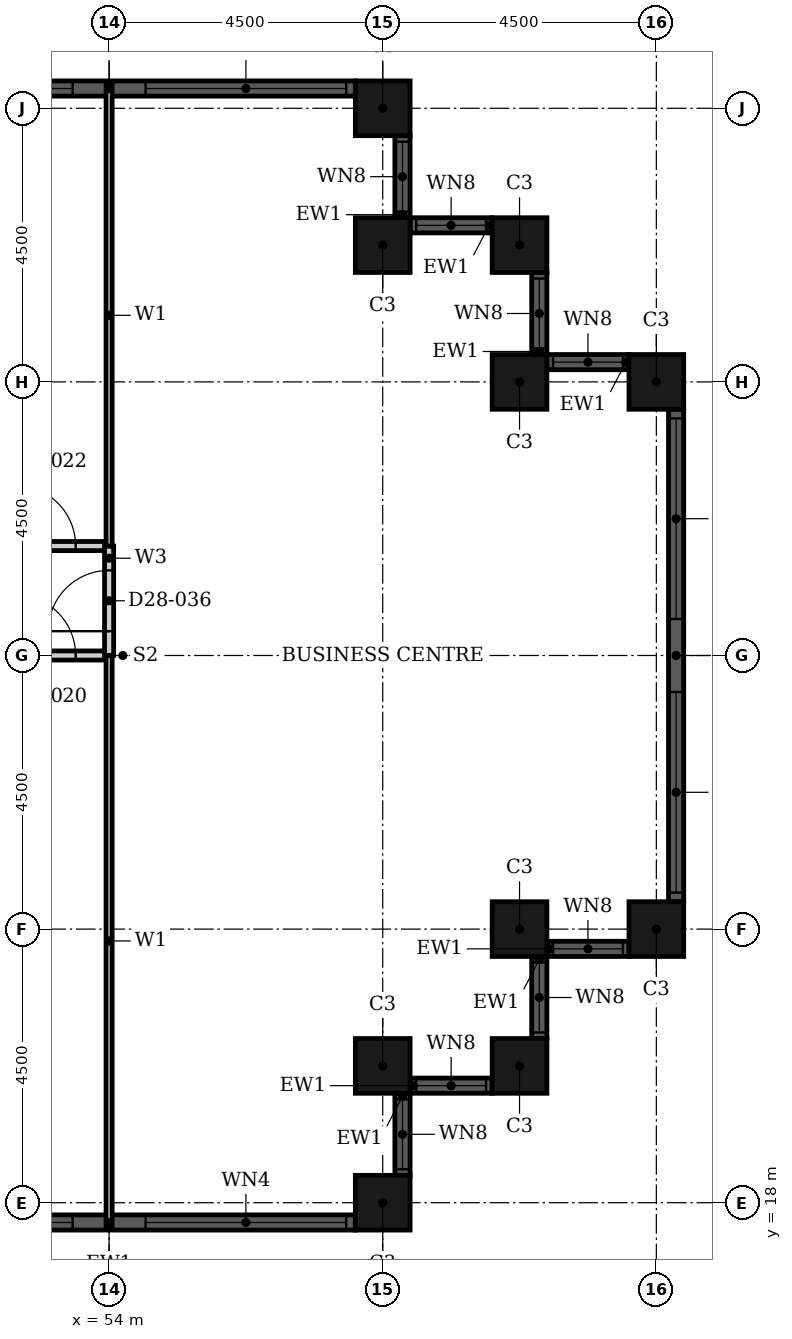
"""IFC4 building model, lengths in metres.
Left out: names, types, materials, properties, quantities, classifications, styles, units other than length and angle.
Written with IfcOpenShell. Run it as: python <this file> out.ifc"""

import sys

from ifc_helpers import new_model, si_unit, direction, frame, frame_2d, origin, origin_2d, place, context, subcontext, project, spatial, rectangle, hollow_rectangle, extrude, element, fill, save


model = new_model("IFC4")
c1 = context("Model", 3, precision=1e-05, world=origin(), true_north=direction((0.0, 1.0)))
c2 = subcontext(c1, "Body", "Model", "MODEL_VIEW")
j1 = project(units=[si_unit("LENGTHUNIT", "METRE"), si_unit("PLANEANGLEUNIT", "RADIAN")], contexts=[c1])
p1 = place(None, origin())
s1 = spatial("IfcSite", under=j1, at=p1, CompositionType="ELEMENT")
p2 = place(p1, origin())
s2 = spatial("IfcBuilding", under=s1, at=p2, CompositionType="ELEMENT")
p3 = place(p2, frame((0.0, 0.0, 115.2)))
s3 = spatial("IfcBuildingStorey", under=s2, at=p3, CompositionType="ELEMENT", Elevation=115.2)
for number, where, z_axis, x_axis in (
    (1, (58.5, 18.0, 0.0), (0.0, 0.0, 1.0), (1.0, 0.0, 0.0)),
    (2, (58.5, 20.25, 0.0), (0.0, 0.0, 1.0), (1.0, 0.0, 0.0)),
    (3, (60.75, 20.25, 0.0), (0.0, 0.0, 1.0), (1.0, 0.0, 0.0)),
    (4, (60.75, 22.5, 0.0), (0.0, 0.0, 1.0), (1.0, 0.0, 0.0)),
    (5, (63.0, 22.5, 0.0), (0.0, 0.0, 1.0), (1.0, 0.0, 0.0)),
    (6, (63.0, 31.5, 0.0), (0.0, 0.0, 1.0), (1.0, 0.0, 0.0)),
    (7, (60.75, 31.5, 0.0), (0.0, 0.0, 1.0), (1.0, 0.0, 0.0)),
    (8, (60.75, 33.75, 0.0), (0.0, 0.0, 1.0), (1.0, 0.0, 0.0)),
    (9, (58.5, 33.75, 0.0), (0.0, 0.0, 1.0), (1.0, 0.0, 0.0)),
    (10, (58.5, 36.0, 0.0), (0.0, 0.0, 1.0), (1.0, 0.0, 0.0)),
):
    element("IfcColumn", number, at=place(p3, frame(where, z_axis=z_axis, x_axis=x_axis)), inside=s3, PredefinedType="COLUMN", context=c2, shape_type="SweptSolid", body=[
        extrude(hollow_rectangle(XDim=0.9, YDim=0.9, WallThickness=0.028, at=origin_2d()), origin(), (0.0, 0.0, 1.0), 3.6),
    ])
p4 = place(p3, frame((49.95, 17.675, 0.0), z_axis=(0.0, 0.0, 1.0), x_axis=(1.0, 0.0, 0.0)))
e11 = element("IfcWall", 11, at=p4, inside=s3, PredefinedType="SOLIDWALL", context=c2, shape_type="SweptSolid", body=[
    extrude(rectangle(XDim=8.1, YDim=0.25, at=frame_2d((4.05, 0.0))), origin(), (0.0, 0.0, 1.0), 3.6),
])
p5 = place(p4, frame((0.15, 0.0, 0.9)))
e12 = element("IfcOpeningElement", 12, at=p5, cuts=e11, PredefinedType="OPENING", context=c2, shape_type="SweptSolid", body=[
    extrude(rectangle(XDim=3.3, YDim=2.08, at=frame_2d((1.65, 1.04))), frame((0.0, 0.135, 0.0), z_axis=(0.0, -1.0, 0.0), x_axis=(1.0, 0.0, 0.0)), (0.0, 0.0, 1.0), 0.27),
])
p6 = place(p4, frame((4.65, 0.0, 0.9)))
e13 = element("IfcOpeningElement", 13, at=p6, cuts=e11, PredefinedType="OPENING", context=c2, shape_type="SweptSolid", body=[
    extrude(rectangle(XDim=3.3, YDim=2.08, at=frame_2d((1.65, 1.04))), frame((0.0, 0.135, 0.0), z_axis=(0.0, -1.0, 0.0), x_axis=(1.0, 0.0, 0.0)), (0.0, 0.0, 1.0), 0.27),
])
p7 = place(p3, frame((58.825, 18.45, 0.0), z_axis=(0.0, 0.0, 1.0), x_axis=(0.0, 1.0, 0.0)))
e14 = element("IfcWall", 14, at=p7, inside=s3, PredefinedType="SOLIDWALL", context=c2, shape_type="SweptSolid", body=[
    extrude(rectangle(XDim=1.35, YDim=0.25, at=frame_2d((0.675, 0.0))), origin(), (0.0, 0.0, 1.0), 3.6),
])
p8 = place(p7, frame((0.1, 0.0, 0.9)))
e15 = element("IfcOpeningElement", 15, at=p8, cuts=e14, PredefinedType="OPENING", context=c2, shape_type="SweptSolid", body=[
    extrude(rectangle(XDim=1.15, YDim=2.08, at=frame_2d((0.575, 1.04))), frame((0.0, 0.135, 0.0), z_axis=(0.0, -1.0, 0.0), x_axis=(1.0, 0.0, 0.0)), (0.0, 0.0, 1.0), 0.27),
])
p9 = place(p3, frame((58.95, 19.925, 0.0), z_axis=(0.0, 0.0, 1.0), x_axis=(1.0, 0.0, 0.0)))
e16 = element("IfcWall", 16, at=p9, inside=s3, PredefinedType="SOLIDWALL", context=c2, shape_type="SweptSolid", body=[
    extrude(rectangle(XDim=1.35, YDim=0.25, at=frame_2d((0.675, 0.0))), origin(), (0.0, 0.0, 1.0), 3.6),
])
p10 = place(p9, frame((0.1, 0.0, 0.9)))
e17 = element("IfcOpeningElement", 17, at=p10, cuts=e16, PredefinedType="OPENING", context=c2, shape_type="SweptSolid", body=[
    extrude(rectangle(XDim=1.15, YDim=2.08, at=frame_2d((0.575, 1.04))), frame((0.0, 0.135, 0.0), z_axis=(0.0, -1.0, 0.0), x_axis=(1.0, 0.0, 0.0)), (0.0, 0.0, 1.0), 0.27),
])
p11 = place(p3, frame((61.075, 20.7, 0.0), z_axis=(0.0, 0.0, 1.0), x_axis=(0.0, 1.0, 0.0)))
e18 = element("IfcWall", 18, at=p11, inside=s3, PredefinedType="SOLIDWALL", context=c2, shape_type="SweptSolid", body=[
    extrude(rectangle(XDim=1.35, YDim=0.25, at=frame_2d((0.675, 0.0))), origin(), (0.0, 0.0, 1.0), 3.6),
])
p12 = place(p11, frame((0.1, 0.0, 0.9)))
e19 = element("IfcOpeningElement", 19, at=p12, cuts=e18, PredefinedType="OPENING", context=c2, shape_type="SweptSolid", body=[
    extrude(rectangle(XDim=1.15, YDim=2.08, at=frame_2d((0.575, 1.04))), frame((0.0, 0.135, 0.0), z_axis=(0.0, -1.0, 0.0), x_axis=(1.0, 0.0, 0.0)), (0.0, 0.0, 1.0), 0.27),
])
p13 = place(p3, frame((61.2, 22.175, 0.0), z_axis=(0.0, 0.0, 1.0), x_axis=(1.0, 0.0, 0.0)))
e20 = element("IfcWall", 20, at=p13, inside=s3, PredefinedType="SOLIDWALL", context=c2, shape_type="SweptSolid", body=[
    extrude(rectangle(XDim=1.35, YDim=0.25, at=frame_2d((0.675, 0.0))), origin(), (0.0, 0.0, 1.0), 3.6),
])
p14 = place(p13, frame((0.1, 0.0, 0.9)))
e21 = element("IfcOpeningElement", 21, at=p14, cuts=e20, PredefinedType="OPENING", context=c2, shape_type="SweptSolid", body=[
    extrude(rectangle(XDim=1.15, YDim=2.08, at=frame_2d((0.575, 1.04))), frame((0.0, 0.135, 0.0), z_axis=(0.0, -1.0, 0.0), x_axis=(1.0, 0.0, 0.0)), (0.0, 0.0, 1.0), 0.27),
])
p15 = place(p3, frame((63.325, 22.95, 0.0), z_axis=(0.0, 0.0, 1.0), x_axis=(0.0, 1.0, 0.0)))
e22 = element("IfcWall", 22, at=p15, inside=s3, PredefinedType="SOLIDWALL", context=c2, shape_type="SweptSolid", body=[
    extrude(rectangle(XDim=8.1, YDim=0.25, at=frame_2d((4.05, 0.0))), origin(), (0.0, 0.0, 1.0), 3.6),
])
p16 = place(p15, frame((0.15, 0.0, 0.9)))
e23 = element("IfcOpeningElement", 23, at=p16, cuts=e22, PredefinedType="OPENING", context=c2, shape_type="SweptSolid", body=[
    extrude(rectangle(XDim=3.3, YDim=2.08, at=frame_2d((1.65, 1.04))), frame((0.0, 0.135, 0.0), z_axis=(0.0, -1.0, 0.0), x_axis=(1.0, 0.0, 0.0)), (0.0, 0.0, 1.0), 0.27),
])
p17 = place(p15, frame((4.65, 0.0, 0.9)))
e24 = element("IfcOpeningElement", 24, at=p17, cuts=e22, PredefinedType="OPENING", context=c2, shape_type="SweptSolid", body=[
    extrude(rectangle(XDim=3.3, YDim=2.08, at=frame_2d((1.65, 1.04))), frame((0.0, 0.135, 0.0), z_axis=(0.0, -1.0, 0.0), x_axis=(1.0, 0.0, 0.0)), (0.0, 0.0, 1.0), 0.27),
])
p18 = place(p3, frame((62.55, 31.825, 0.0), z_axis=(0.0, 0.0, 1.0), x_axis=(-1.0, 0.0, 0.0)))
e25 = element("IfcWall", 25, at=p18, inside=s3, PredefinedType="SOLIDWALL", context=c2, shape_type="SweptSolid", body=[
    extrude(rectangle(XDim=1.35, YDim=0.25, at=frame_2d((0.675, 0.0))), origin(), (0.0, 0.0, 1.0), 3.6),
])
p19 = place(p18, frame((0.1, 0.0, 0.9)))
e26 = element("IfcOpeningElement", 26, at=p19, cuts=e25, PredefinedType="OPENING", context=c2, shape_type="SweptSolid", body=[
    extrude(rectangle(XDim=1.15, YDim=2.08, at=frame_2d((0.575, 1.04))), frame((0.0, 0.135, 0.0), z_axis=(0.0, -1.0, 0.0), x_axis=(1.0, 0.0, 0.0)), (0.0, 0.0, 1.0), 0.27),
])
p20 = place(p3, frame((61.075, 31.95, 0.0), z_axis=(0.0, 0.0, 1.0), x_axis=(0.0, 1.0, 0.0)))
e27 = element("IfcWall", 27, at=p20, inside=s3, PredefinedType="SOLIDWALL", context=c2, shape_type="SweptSolid", body=[
    extrude(rectangle(XDim=1.35, YDim=0.25, at=frame_2d((0.675, 0.0))), origin(), (0.0, 0.0, 1.0), 3.6),
])
p21 = place(p20, frame((0.1, 0.0, 0.9)))
e28 = element("IfcOpeningElement", 28, at=p21, cuts=e27, PredefinedType="OPENING", context=c2, shape_type="SweptSolid", body=[
    extrude(rectangle(XDim=1.15, YDim=2.08, at=frame_2d((0.575, 1.04))), frame((0.0, 0.135, 0.0), z_axis=(0.0, -1.0, 0.0), x_axis=(1.0, 0.0, 0.0)), (0.0, 0.0, 1.0), 0.27),
])
p22 = place(p3, frame((60.3, 34.075, 0.0), z_axis=(0.0, 0.0, 1.0), x_axis=(-1.0, 0.0, 0.0)))
e29 = element("IfcWall", 29, at=p22, inside=s3, PredefinedType="SOLIDWALL", context=c2, shape_type="SweptSolid", body=[
    extrude(rectangle(XDim=1.35, YDim=0.25, at=frame_2d((0.675, 0.0))), origin(), (0.0, 0.0, 1.0), 3.6),
])
p23 = place(p22, frame((0.1, 0.0, 0.9)))
e30 = element("IfcOpeningElement", 30, at=p23, cuts=e29, PredefinedType="OPENING", context=c2, shape_type="SweptSolid", body=[
    extrude(rectangle(XDim=1.15, YDim=2.08, at=frame_2d((0.575, 1.04))), frame((0.0, 0.135, 0.0), z_axis=(0.0, -1.0, 0.0), x_axis=(1.0, 0.0, 0.0)), (0.0, 0.0, 1.0), 0.27),
])
p24 = place(p3, frame((58.825, 34.2, 0.0), z_axis=(0.0, 0.0, 1.0), x_axis=(0.0, 1.0, 0.0)))
e31 = element("IfcWall", 31, at=p24, inside=s3, PredefinedType="SOLIDWALL", context=c2, shape_type="SweptSolid", body=[
    extrude(rectangle(XDim=1.35, YDim=0.25, at=frame_2d((0.675, 0.0))), origin(), (0.0, 0.0, 1.0), 3.6),
])
p25 = place(p24, frame((0.1, 0.0, 0.9)))
e32 = element("IfcOpeningElement", 32, at=p25, cuts=e31, PredefinedType="OPENING", context=c2, shape_type="SweptSolid", body=[
    extrude(rectangle(XDim=1.15, YDim=2.08, at=frame_2d((0.575, 1.04))), frame((0.0, 0.135, 0.0), z_axis=(0.0, -1.0, 0.0), x_axis=(1.0, 0.0, 0.0)), (0.0, 0.0, 1.0), 0.27),
])
p26 = place(p3, frame((58.05, 36.325, 0.0), z_axis=(0.0, 0.0, 1.0), x_axis=(-1.0, 0.0, 0.0)))
e33 = element("IfcWall", 33, at=p26, inside=s3, PredefinedType="SOLIDWALL", context=c2, shape_type="SweptSolid", body=[
    extrude(rectangle(XDim=8.1, YDim=0.25, at=frame_2d((4.05, 0.0))), origin(), (0.0, 0.0, 1.0), 3.6),
])
p27 = place(p26, frame((0.15, 0.0, 0.9)))
e34 = element("IfcOpeningElement", 34, at=p27, cuts=e33, PredefinedType="OPENING", context=c2, shape_type="SweptSolid", body=[
    extrude(rectangle(XDim=3.3, YDim=2.08, at=frame_2d((1.65, 1.04))), frame((0.0, 0.135, 0.0), z_axis=(0.0, -1.0, 0.0), x_axis=(1.0, 0.0, 0.0)), (0.0, 0.0, 1.0), 0.27),
])
p28 = place(p26, frame((4.65, 0.0, 0.9)))
e35 = element("IfcOpeningElement", 35, at=p28, cuts=e33, PredefinedType="OPENING", context=c2, shape_type="SweptSolid", body=[
    extrude(rectangle(XDim=3.3, YDim=2.08, at=frame_2d((1.65, 1.04))), frame((0.0, 0.135, 0.0), z_axis=(0.0, -1.0, 0.0), x_axis=(1.0, 0.0, 0.0)), (0.0, 0.0, 1.0), 0.27),
])
p29 = place(p3, frame((46.8, 27.0, 0.0), z_axis=(0.0, 0.0, 1.0), x_axis=(1.0, 0.0, 0.0)))
e36 = element("IfcWall", 36, at=p29, inside=s3, PredefinedType="PARTITIONING", context=c2, shape_type="SweptSolid", body=[
    extrude(rectangle(XDim=7.2, YDim=0.15, at=frame_2d((3.6, 0.0))), origin(), (0.0, 0.0, 1.0), 2.58),
])
p30 = place(p29, frame((5.65, 0.0, 0.0)))
e37 = element("IfcOpeningElement", 37, at=p30, cuts=e36, PredefinedType="OPENING", context=c2, shape_type="SweptSolid", body=[
    extrude(rectangle(XDim=1.0, YDim=2.1, at=frame_2d((0.5, 1.05))), frame((0.0, 0.085, 0.0), z_axis=(0.0, -1.0, 0.0), x_axis=(1.0, 0.0, 0.0)), (0.0, 0.0, 1.0), 0.17),
])
p31 = place(p3, frame((46.8, 28.8, 0.0), z_axis=(0.0, 0.0, 1.0), x_axis=(1.0, 0.0, 0.0)))
e38 = element("IfcWall", 38, at=p31, inside=s3, PredefinedType="PARTITIONING", context=c2, shape_type="SweptSolid", body=[
    extrude(rectangle(XDim=7.2, YDim=0.15, at=frame_2d((3.6, 0.0))), origin(), (0.0, 0.0, 1.0), 3.3),
])
p32 = place(p31, frame((5.65, 0.0, 0.0)))
e39 = element("IfcOpeningElement", 39, at=p32, cuts=e38, PredefinedType="OPENING", context=c2, shape_type="SweptSolid", body=[
    extrude(rectangle(XDim=1.0, YDim=2.1, at=frame_2d((0.5, 1.05))), frame((0.0, 0.085, 0.0), z_axis=(0.0, -1.0, 0.0), x_axis=(1.0, 0.0, 0.0)), (0.0, 0.0, 1.0), 0.17),
])
p33 = place(p3, frame((54.0, 27.0, 0.0), z_axis=(0.0, 0.0, 1.0), x_axis=(0.0, 1.0, 0.0)))
e40 = element("IfcWall", 40, at=p33, inside=s3, PredefinedType="PARTITIONING", context=c2, shape_type="SweptSolid", body=[
    extrude(rectangle(XDim=1.8, YDim=0.15, at=frame_2d((0.9, 0.0))), origin(), (0.0, 0.0, 1.0), 3.3),
])
p34 = place(p33, frame((0.4, 0.0, 0.0)))
e41 = element("IfcOpeningElement", 41, at=p34, cuts=e40, PredefinedType="OPENING", context=c2, shape_type="SweptSolid", body=[
    extrude(rectangle(XDim=1.0, YDim=2.1, at=frame_2d((0.5, 1.05))), frame((0.0, 0.085, 0.0), z_axis=(0.0, -1.0, 0.0), x_axis=(1.0, 0.0, 0.0)), (0.0, 0.0, 1.0), 0.17),
])
p35 = place(p3, frame((54.0, 28.8, 0.0), z_axis=(0.0, 0.0, 1.0), x_axis=(0.0, 1.0, 0.0)))
e42 = element("IfcWall", 42, at=p35, inside=s3, PredefinedType="PARTITIONING", context=c2, shape_type="SweptSolid", body=[
    extrude(rectangle(XDim=7.59, YDim=0.1, at=frame_2d((3.795, 0.0))), origin(), (0.0, 0.0, 1.0), 3.3),
])
p36 = place(p3, frame((54.0, 17.61, 0.0), z_axis=(0.0, 0.0, 1.0), x_axis=(0.0, 1.0, 0.0)))
e43 = element("IfcWall", 43, at=p36, inside=s3, PredefinedType="PARTITIONING", context=c2, shape_type="SweptSolid", body=[
    extrude(rectangle(XDim=9.39, YDim=0.1, at=frame_2d((4.695, 0.0))), origin(), (0.0, 0.0, 1.0), 3.3),
])
p37 = place(p5, origin())
e44 = element("IfcWindow", 44, at=p37, inside=s3, PartitioningType="SINGLE_PANEL", PredefinedType="WINDOW", context=c2, shape_type="SweptSolid", body=[
    extrude(rectangle(XDim=3.3, YDim=2.08, at=frame_2d((1.65, 1.04))), frame((0.0, 0.03, 0.0), z_axis=(0.0, -1.0, 0.0), x_axis=(1.0, 0.0, 0.0)), (0.0, 0.0, 1.0), 0.06),
])
fill(e12, e44)
p38 = place(p6, origin())
e45 = element("IfcWindow", 45, at=p38, inside=s3, PartitioningType="SINGLE_PANEL", PredefinedType="WINDOW", context=c2, shape_type="SweptSolid", body=[
    extrude(rectangle(XDim=3.3, YDim=2.08, at=frame_2d((1.65, 1.04))), frame((0.0, 0.03, 0.0), z_axis=(0.0, -1.0, 0.0), x_axis=(1.0, 0.0, 0.0)), (0.0, 0.0, 1.0), 0.06),
])
fill(e13, e45)
p39 = place(p8, origin())
e46 = element("IfcWindow", 46, at=p39, inside=s3, PartitioningType="SINGLE_PANEL", PredefinedType="WINDOW", context=c2, shape_type="SweptSolid", body=[
    extrude(rectangle(XDim=1.15, YDim=2.08, at=frame_2d((0.575, 1.04))), frame((0.0, 0.03, 0.0), z_axis=(0.0, -1.0, 0.0), x_axis=(1.0, 0.0, 0.0)), (0.0, 0.0, 1.0), 0.06),
])
fill(e15, e46)
p40 = place(p10, origin())
e47 = element("IfcWindow", 47, at=p40, inside=s3, PartitioningType="SINGLE_PANEL", PredefinedType="WINDOW", context=c2, shape_type="SweptSolid", body=[
    extrude(rectangle(XDim=1.15, YDim=2.08, at=frame_2d((0.575, 1.04))), frame((0.0, 0.03, 0.0), z_axis=(0.0, -1.0, 0.0), x_axis=(1.0, 0.0, 0.0)), (0.0, 0.0, 1.0), 0.06),
])
fill(e17, e47)
p41 = place(p12, origin())
e48 = element("IfcWindow", 48, at=p41, inside=s3, PartitioningType="SINGLE_PANEL", PredefinedType="WINDOW", context=c2, shape_type="SweptSolid", body=[
    extrude(rectangle(XDim=1.15, YDim=2.08, at=frame_2d((0.575, 1.04))), frame((0.0, 0.03, 0.0), z_axis=(0.0, -1.0, 0.0), x_axis=(1.0, 0.0, 0.0)), (0.0, 0.0, 1.0), 0.06),
])
fill(e19, e48)
p42 = place(p14, origin())
e49 = element("IfcWindow", 49, at=p42, inside=s3, PartitioningType="SINGLE_PANEL", PredefinedType="WINDOW", context=c2, shape_type="SweptSolid", body=[
    extrude(rectangle(XDim=1.15, YDim=2.08, at=frame_2d((0.575, 1.04))), frame((0.0, 0.03, 0.0), z_axis=(0.0, -1.0, 0.0), x_axis=(1.0, 0.0, 0.0)), (0.0, 0.0, 1.0), 0.06),
])
fill(e21, e49)
p43 = place(p16, origin())
e50 = element("IfcWindow", 50, at=p43, inside=s3, PartitioningType="SINGLE_PANEL", PredefinedType="WINDOW", context=c2, shape_type="SweptSolid", body=[
    extrude(rectangle(XDim=3.3, YDim=2.08, at=frame_2d((1.65, 1.04))), frame((0.0, 0.03, 0.0), z_axis=(0.0, -1.0, 0.0), x_axis=(1.0, 0.0, 0.0)), (0.0, 0.0, 1.0), 0.06),
])
fill(e23, e50)
p44 = place(p17, origin())
e51 = element("IfcWindow", 51, at=p44, inside=s3, PartitioningType="SINGLE_PANEL", PredefinedType="WINDOW", context=c2, shape_type="SweptSolid", body=[
    extrude(rectangle(XDim=3.3, YDim=2.08, at=frame_2d((1.65, 1.04))), frame((0.0, 0.03, 0.0), z_axis=(0.0, -1.0, 0.0), x_axis=(1.0, 0.0, 0.0)), (0.0, 0.0, 1.0), 0.06),
])
fill(e24, e51)
p45 = place(p19, origin())
e52 = element("IfcWindow", 52, at=p45, inside=s3, PartitioningType="SINGLE_PANEL", PredefinedType="WINDOW", context=c2, shape_type="SweptSolid", body=[
    extrude(rectangle(XDim=1.15, YDim=2.08, at=frame_2d((0.575, 1.04))), frame((0.0, 0.03, 0.0), z_axis=(0.0, -1.0, 0.0), x_axis=(1.0, 0.0, 0.0)), (0.0, 0.0, 1.0), 0.06),
])
fill(e26, e52)
p46 = place(p21, origin())
e53 = element("IfcWindow", 53, at=p46, inside=s3, PartitioningType="SINGLE_PANEL", PredefinedType="WINDOW", context=c2, shape_type="SweptSolid", body=[
    extrude(rectangle(XDim=1.15, YDim=2.08, at=frame_2d((0.575, 1.04))), frame((0.0, 0.03, 0.0), z_axis=(0.0, -1.0, 0.0), x_axis=(1.0, 0.0, 0.0)), (0.0, 0.0, 1.0), 0.06),
])
fill(e28, e53)
p47 = place(p23, origin())
e54 = element("IfcWindow", 54, at=p47, inside=s3, PartitioningType="SINGLE_PANEL", PredefinedType="WINDOW", context=c2, shape_type="SweptSolid", body=[
    extrude(rectangle(XDim=1.15, YDim=2.08, at=frame_2d((0.575, 1.04))), frame((0.0, 0.03, 0.0), z_axis=(0.0, -1.0, 0.0), x_axis=(1.0, 0.0, 0.0)), (0.0, 0.0, 1.0), 0.06),
])
fill(e30, e54)
p48 = place(p25, origin())
e55 = element("IfcWindow", 55, at=p48, inside=s3, PartitioningType="SINGLE_PANEL", PredefinedType="WINDOW", context=c2, shape_type="SweptSolid", body=[
    extrude(rectangle(XDim=1.15, YDim=2.08, at=frame_2d((0.575, 1.04))), frame((0.0, 0.03, 0.0), z_axis=(0.0, -1.0, 0.0), x_axis=(1.0, 0.0, 0.0)), (0.0, 0.0, 1.0), 0.06),
])
fill(e32, e55)
p49 = place(p27, origin())
e56 = element("IfcWindow", 56, at=p49, inside=s3, PartitioningType="SINGLE_PANEL", PredefinedType="WINDOW", context=c2, shape_type="SweptSolid", body=[
    extrude(rectangle(XDim=3.3, YDim=2.08, at=frame_2d((1.65, 1.04))), frame((0.0, 0.03, 0.0), z_axis=(0.0, -1.0, 0.0), x_axis=(1.0, 0.0, 0.0)), (0.0, 0.0, 1.0), 0.06),
])
fill(e34, e56)
p50 = place(p28, origin())
e57 = element("IfcWindow", 57, at=p50, inside=s3, PartitioningType="SINGLE_PANEL", PredefinedType="WINDOW", context=c2, shape_type="SweptSolid", body=[
    extrude(rectangle(XDim=3.3, YDim=2.08, at=frame_2d((1.65, 1.04))), frame((0.0, 0.03, 0.0), z_axis=(0.0, -1.0, 0.0), x_axis=(1.0, 0.0, 0.0)), (0.0, 0.0, 1.0), 0.06),
])
fill(e35, e57)
p51 = place(p30, origin())
e58 = element("IfcDoor", 58, at=p51, inside=s3, OperationType="SINGLE_SWING_RIGHT", PredefinedType="DOOR", context=c2, shape_type="SweptSolid", body=[
    extrude(rectangle(XDim=1.0, YDim=2.1, at=frame_2d((0.5, 1.05))), frame((0.0, 0.025, 0.0), z_axis=(0.0, -1.0, 0.0), x_axis=(1.0, 0.0, 0.0)), (0.0, 0.0, 1.0), 0.05),
])
fill(e37, e58)
p52 = place(p32, origin())
e59 = element("IfcDoor", 59, at=p52, inside=s3, OperationType="SINGLE_SWING_RIGHT", PredefinedType="DOOR", context=c2, shape_type="SweptSolid", body=[
    extrude(rectangle(XDim=1.0, YDim=2.1, at=frame_2d((0.5, 1.05))), frame((0.0, 0.025, 0.0), z_axis=(0.0, -1.0, 0.0), x_axis=(1.0, 0.0, 0.0)), (0.0, 0.0, 1.0), 0.05),
])
fill(e39, e59)
p53 = place(p34, origin())
e60 = element("IfcDoor", 60, at=p53, inside=s3, OperationType="SINGLE_SWING_RIGHT", PredefinedType="DOOR", context=c2, shape_type="SweptSolid", body=[
    extrude(rectangle(XDim=1.0, YDim=2.1, at=frame_2d((0.5, 1.05))), frame((0.0, 0.025, 0.0), z_axis=(0.0, -1.0, 0.0), x_axis=(1.0, 0.0, 0.0)), (0.0, 0.0, 1.0), 0.05),
])
fill(e41, e60)
save(model, sys.argv[1])
